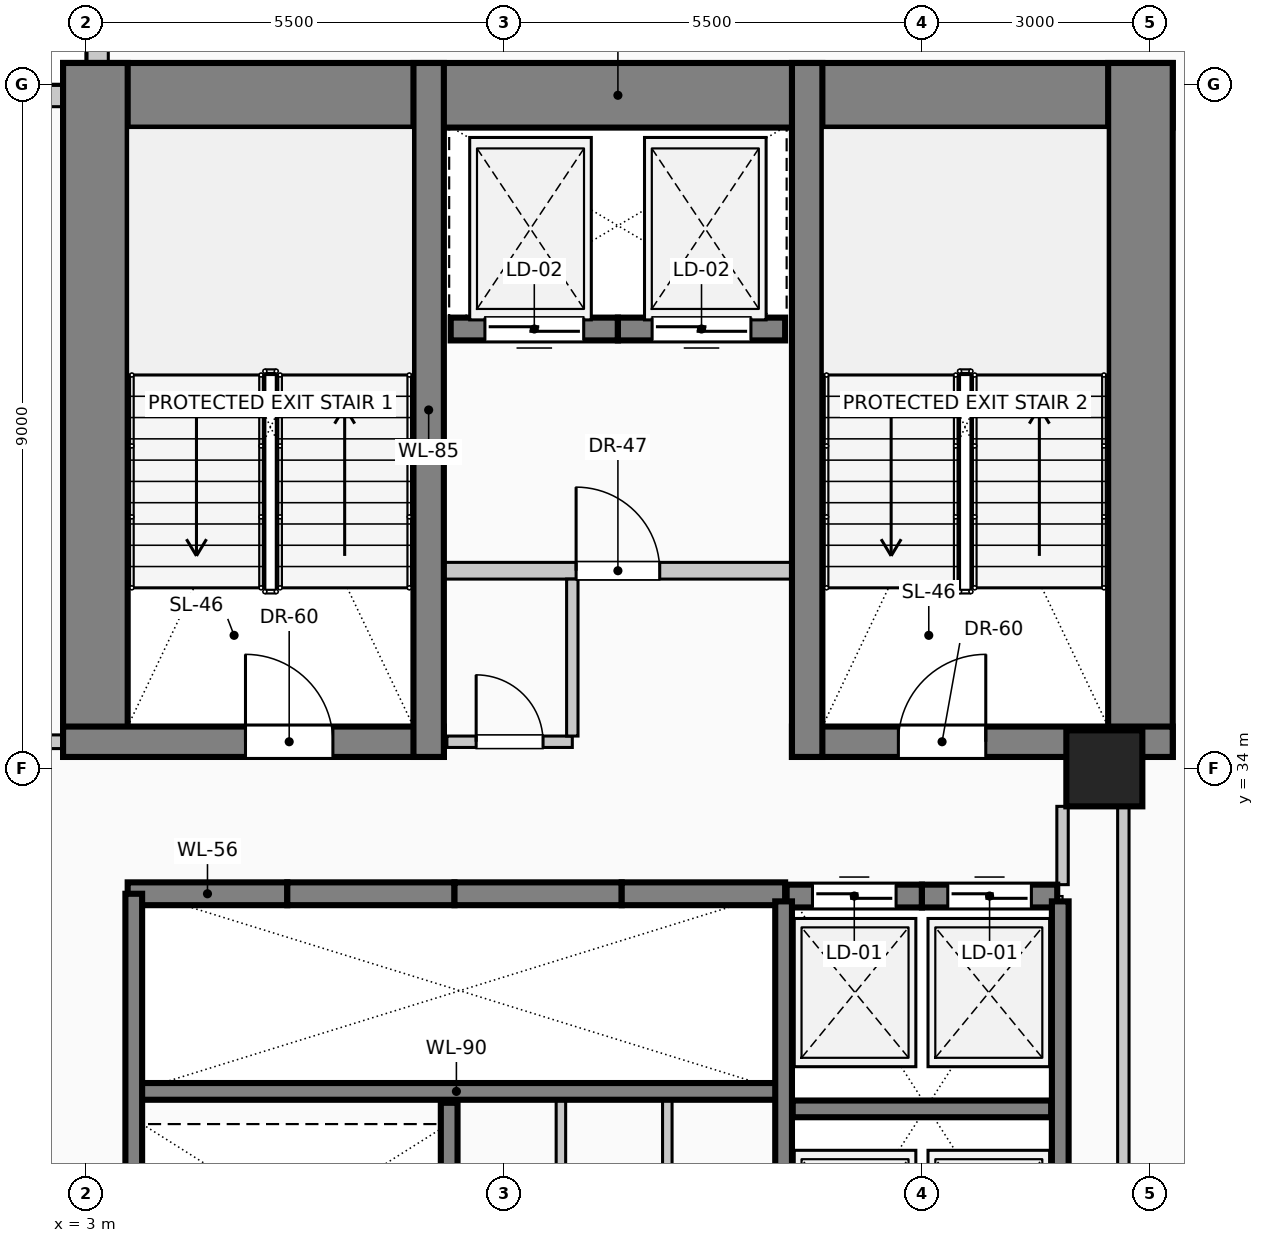
"""IFC4 building model, lengths in metres.
Left out: names, types, materials, properties, quantities, classifications, styles, units other than length and angle.
Written with IfcOpenShell. Run it as: python <this file> out.ifc"""

import sys

from ifc_helpers import new_model, si_unit, direction, frame, frame_2d, origin, origin_2d, place, context, subcontext, project, spatial, rectangle, circle, extrude, element, fill, save


model = new_model("IFC4")
c1 = context("Model", 3, precision=1e-05, world=origin(), true_north=direction((0.0, 1.0)))
c2 = subcontext(c1, "Body", "Model", "MODEL_VIEW")
j1 = project(units=[si_unit("LENGTHUNIT", "METRE"), si_unit("PLANEANGLEUNIT", "RADIAN")], contexts=[c1])
p1 = place(None, origin())
s1 = spatial("IfcSite", under=j1, at=p1, CompositionType="ELEMENT")
p2 = place(p1, origin())
s2 = spatial("IfcBuilding", under=s1, at=p2, CompositionType="ELEMENT")
p3 = place(p2, frame((0.0, 0.0, 116.6)))
s3 = spatial("IfcBuildingStorey", under=s2, at=p3, CompositionType="ELEMENT", Elevation=116.6)
p4 = place(p3, frame((2.7, 42.855, 0.0), z_axis=(0.0, 0.0, 1.0), x_axis=(1.0, 0.0, 0.0)))
e1 = element("IfcWall", 1, at=p4, inside=s3, PredefinedType="SHEAR", context=c2, shape_type="SweptSolid", body=[
    extrude(rectangle(XDim=14.6, YDim=0.85, at=frame_2d((7.3, 0.0))), origin(), (0.0, 0.0, 1.0), 4.0),
])
for number, where, z_axis, x_axis in (
    (2, (3.125, 34.15, 0.0), (0.0, 0.0, 1.0), (0.0, 1.0, 0.0)),
    (3, (16.875, 34.15, 0.0), (0.0, 0.0, 1.0), (0.0, 1.0, 0.0)),
):
    element("IfcWall", number, at=place(p3, frame(where, z_axis=z_axis, x_axis=x_axis)), inside=s3, PredefinedType="SHEAR", context=c2, shape_type="SweptSolid", body=[
        extrude(rectangle(XDim=9.13, YDim=0.85, at=frame_2d((4.565, 0.0))), origin(), (0.0, 0.0, 1.0), 4.0),
    ])
p5 = place(p3, frame((2.7, 34.35, 0.0), z_axis=(0.0, 0.0, 1.0), x_axis=(1.0, 0.0, 0.0)))
e4 = element("IfcWall", 4, at=p5, inside=s3, PredefinedType="SHEAR", context=c2, shape_type="SweptSolid", body=[
    extrude(rectangle(XDim=5.01, YDim=0.4, at=frame_2d((2.505, 0.0))), origin(), (0.0, 0.0, 1.0), 4.0),
])
p6 = place(p5, frame((2.4, 0.0, 0.0)))
e5 = element("IfcOpeningElement", 5, at=p6, cuts=e4, PredefinedType="OPENING", context=c2, shape_type="SweptSolid", body=[
    extrude(rectangle(XDim=1.15, YDim=2.2, at=frame_2d((0.575, 1.1))), frame((0.0, 0.21, 0.0), z_axis=(0.0, -1.0, 0.0), x_axis=(1.0, 0.0, 0.0)), (0.0, 0.0, 1.0), 0.42),
])
p7 = place(p3, frame((12.29, 34.35, 0.0), z_axis=(0.0, 0.0, 1.0), x_axis=(1.0, 0.0, 0.0)))
e6 = element("IfcWall", 6, at=p7, inside=s3, PredefinedType="SHEAR", context=c2, shape_type="SweptSolid", body=[
    extrude(rectangle(XDim=5.01, YDim=0.4, at=frame_2d((2.505, 0.0))), origin(), (0.0, 0.0, 1.0), 4.0),
])
p8 = place(p7, frame((1.4, 0.0, 0.0)))
e7 = element("IfcOpeningElement", 7, at=p8, cuts=e6, PredefinedType="OPENING", context=c2, shape_type="SweptSolid", body=[
    extrude(rectangle(XDim=1.15, YDim=2.2, at=frame_2d((0.575, 1.1))), frame((0.0, 0.21, 0.0), z_axis=(0.0, -1.0, 0.0), x_axis=(1.0, 0.0, 0.0)), (0.0, 0.0, 1.0), 0.42),
])
for number, where, z_axis, x_axis in (
    (8, (7.51, 34.15, 0.0), (0.0, 0.0, 1.0), (0.0, 1.0, 0.0)),
    (9, (12.49, 34.15, 0.0), (0.0, 0.0, 1.0), (0.0, 1.0, 0.0)),
):
    element("IfcWall", number, at=place(p3, frame(where, z_axis=z_axis, x_axis=x_axis)), inside=s3, PredefinedType="SHEAR", context=c2, shape_type="SweptSolid", body=[
        extrude(rectangle(XDim=9.13, YDim=0.4, at=frame_2d((4.565, 0.0))), origin(), (0.0, 0.0, 1.0), 4.0),
    ])
p9 = place(p3, frame((16.4, 34.0, 0.0), z_axis=(0.0, 0.0, 1.0), x_axis=(1.0, 0.0, 0.0)))
e10 = element("IfcColumn", 10, at=p9, inside=s3, PredefinedType="COLUMN", context=c2, shape_type="SweptSolid", body=[
    extrude(circle(Radius=0.5, at=origin_2d()), origin(), (0.0, 0.0, 1.0), 4.0),
])
p10 = place(p3, frame((0.6, 42.845, 0.0), z_axis=(0.0, 0.0, 1.0), x_axis=(1.0, 0.0, 0.0)))
e11 = element("IfcWall", 11, at=p10, inside=s3, PredefinedType="SOLIDWALL", context=c2, shape_type="SweptSolid", body=[
    extrude(rectangle(XDim=2.095, YDim=0.28, at=frame_2d((1.047, 0.0))), origin(), (0.0, 0.0, 1.0), 3.725),
])
p11 = place(p3, frame((3.155, 43.285, 0.0), z_axis=(0.0, 0.0, 1.0), x_axis=(0.0, 1.0, 0.0)))
e12 = element("IfcWall", 12, at=p11, inside=s3, PredefinedType="SOLIDWALL", context=c2, shape_type="SweptSolid", body=[
    extrude(rectangle(XDim=2.115, YDim=0.28, at=frame_2d((1.058, 0.0))), origin(), (0.0, 0.0, 1.0), 3.725),
])
p12 = place(p3, frame((12.22, 32.32, 0.0), z_axis=(0.0, 0.0, 1.0), x_axis=(1.0, 0.0, 0.0)))
e13 = element("IfcWall", 13, at=p12, inside=s3, PredefinedType="SOLIDWALL", context=c2, shape_type="SweptSolid", body=[
    extrude(rectangle(XDim=1.78, YDim=0.3, at=frame_2d((0.89, 0.0))), origin(), (0.0, 0.0, 1.0), 4.0),
])
p13 = place(p12, frame((0.34, 0.0, 0.0)))
e14 = element("IfcOpeningElement", 14, at=p13, cuts=e13, PredefinedType="OPENING", context=c2, shape_type="SweptSolid", body=[
    extrude(rectangle(XDim=1.1, YDim=2.2, at=frame_2d((0.55, 1.1))), frame((0.0, 0.16, 0.0), z_axis=(0.0, -1.0, 0.0), x_axis=(1.0, 0.0, 0.0)), (0.0, 0.0, 1.0), 0.32),
])
p14 = place(p3, frame((14.0, 32.32, 0.0), z_axis=(0.0, 0.0, 1.0), x_axis=(1.0, 0.0, 0.0)))
e15 = element("IfcWall", 15, at=p14, inside=s3, PredefinedType="SOLIDWALL", context=c2, shape_type="SweptSolid", body=[
    extrude(rectangle(XDim=1.78, YDim=0.3, at=frame_2d((0.89, 0.0))), origin(), (0.0, 0.0, 1.0), 4.0),
])
p15 = place(p14, frame((0.34, 0.0, 0.0)))
e16 = element("IfcOpeningElement", 16, at=p15, cuts=e15, PredefinedType="OPENING", context=c2, shape_type="SweptSolid", body=[
    extrude(rectangle(XDim=1.1, YDim=2.2, at=frame_2d((0.55, 1.1))), frame((0.0, 0.16, 0.0), z_axis=(0.0, -1.0, 0.0), x_axis=(1.0, 0.0, 0.0)), (0.0, 0.0, 1.0), 0.32),
])
p16 = place(p3, frame((3.55, 32.35, 0.0), z_axis=(0.0, 0.0, 1.0), x_axis=(1.0, 0.0, 0.0)))
e17 = element("IfcWall", 17, at=p16, inside=s3, PredefinedType="SOLIDWALL", context=c2, shape_type="SweptSolid", body=[
    extrude(rectangle(XDim=2.1, YDim=0.3, at=frame_2d((1.05, 0.0))), origin(), (0.0, 0.0, 1.0), 4.0),
])
p17 = place(p3, frame((5.65, 32.35, 0.0), z_axis=(0.0, 0.0, 1.0), x_axis=(1.0, 0.0, 0.0)))
e18 = element("IfcWall", 18, at=p17, inside=s3, PredefinedType="SOLIDWALL", context=c2, shape_type="SweptSolid", body=[
    extrude(rectangle(XDim=2.2, YDim=0.3, at=frame_2d((1.1, 0.0))), origin(), (0.0, 0.0, 1.0), 4.0),
])
p18 = place(p3, frame((7.85, 32.35, 0.0), z_axis=(0.0, 0.0, 1.0), x_axis=(1.0, 0.0, 0.0)))
e19 = element("IfcWall", 19, at=p18, inside=s3, PredefinedType="SOLIDWALL", context=c2, shape_type="SweptSolid", body=[
    extrude(rectangle(XDim=2.2, YDim=0.3, at=frame_2d((1.1, 0.0))), origin(), (0.0, 0.0, 1.0), 4.0),
])
p19 = place(p3, frame((10.05, 32.35, 0.0), z_axis=(0.0, 0.0, 1.0), x_axis=(1.0, 0.0, 0.0)))
e20 = element("IfcWall", 20, at=p19, inside=s3, PredefinedType="SOLIDWALL", context=c2, shape_type="SweptSolid", body=[
    extrude(rectangle(XDim=2.15, YDim=0.3, at=frame_2d((1.075, 0.0))), origin(), (0.0, 0.0, 1.0), 4.0),
])
p20 = place(p3, frame((10.0, 39.78, 0.0), z_axis=(0.0, 0.0, 1.0), x_axis=(-1.0, 0.0, 0.0)))
e21 = element("IfcWall", 21, at=p20, inside=s3, PredefinedType="SOLIDWALL", context=c2, shape_type="SweptSolid", body=[
    extrude(rectangle(XDim=2.2, YDim=0.3, at=frame_2d((1.1, 0.0))), origin(), (0.0, 0.0, 1.0), 4.0),
])
p21 = place(p20, frame((0.45, 0.0, 0.0)))
e22 = element("IfcOpeningElement", 22, at=p21, cuts=e21, PredefinedType="OPENING", context=c2, shape_type="SweptSolid", body=[
    extrude(rectangle(XDim=1.3, YDim=2.25, at=frame_2d((0.65, 1.125))), frame((0.0, 0.16, 0.0), z_axis=(0.0, -1.0, 0.0), x_axis=(1.0, 0.0, 0.0)), (0.0, 0.0, 1.0), 0.32),
])
p22 = place(p3, frame((12.2, 39.78, 0.0), z_axis=(0.0, 0.0, 1.0), x_axis=(-1.0, 0.0, 0.0)))
e23 = element("IfcWall", 23, at=p22, inside=s3, PredefinedType="SOLIDWALL", context=c2, shape_type="SweptSolid", body=[
    extrude(rectangle(XDim=2.2, YDim=0.3, at=frame_2d((1.1, 0.0))), origin(), (0.0, 0.0, 1.0), 4.0),
])
p23 = place(p22, frame((0.45, 0.0, 0.0)))
e24 = element("IfcOpeningElement", 24, at=p23, cuts=e23, PredefinedType="OPENING", context=c2, shape_type="SweptSolid", body=[
    extrude(rectangle(XDim=1.3, YDim=2.25, at=frame_2d((0.65, 1.125))), frame((0.0, 0.16, 0.0), z_axis=(0.0, -1.0, 0.0), x_axis=(1.0, 0.0, 0.0)), (0.0, 0.0, 1.0), 0.32),
])
p24 = place(p3, frame((3.55, 29.75, 0.0), z_axis=(0.0, 0.0, 1.0), x_axis=(1.0, 0.0, 0.0)))
e25 = element("IfcWall", 25, at=p24, inside=s3, PredefinedType="SOLIDWALL", context=c2, shape_type="SweptSolid", body=[
    extrude(rectangle(XDim=8.65, YDim=0.22, at=frame_2d((4.325, 0.0))), origin(), (0.0, 0.0, 1.0), 4.0),
])
p25 = place(p3, frame((3.63, 26.8, 0.0), z_axis=(0.0, 0.0, 1.0), x_axis=(0.0, 1.0, 0.0)))
e26 = element("IfcWall", 26, at=p25, inside=s3, PredefinedType="SOLIDWALL", context=c2, shape_type="SweptSolid", body=[
    extrude(rectangle(XDim=5.55, YDim=0.22, at=frame_2d((2.775, 0.0))), origin(), (0.0, 0.0, 1.0), 4.0),
])
p26 = place(p3, frame((7.78, 26.8, 0.0), z_axis=(0.0, 0.0, 1.0), x_axis=(0.0, 1.0, 0.0)))
e27 = element("IfcWall", 27, at=p26, inside=s3, PredefinedType="SOLIDWALL", context=c2, shape_type="SweptSolid", body=[
    extrude(rectangle(XDim=2.8, YDim=0.22, at=frame_2d((1.4, 0.0))), origin(), (0.0, 0.0, 1.0), 4.0),
])
for number, where, z_axis, x_axis in (
    (28, (12.18, 26.8, 0.0), (0.0, 0.0, 1.0), (0.0, 1.0, 0.0)),
    (29, (15.82, 26.8, 0.0), (0.0, 0.0, 1.0), (0.0, 1.0, 0.0)),
):
    element("IfcWall", number, at=place(p3, frame(where, z_axis=z_axis, x_axis=x_axis)), inside=s3, PredefinedType="SOLIDWALL", context=c2, shape_type="SweptSolid", body=[
        extrude(rectangle(XDim=5.45, YDim=0.22, at=frame_2d((2.725, 0.0))), origin(), (0.0, 0.0, 1.0), 4.0),
    ])
p27 = place(p3, frame((12.3, 29.52, 0.0), z_axis=(0.0, 0.0, 1.0), x_axis=(1.0, 0.0, 0.0)))
e30 = element("IfcWall", 30, at=p27, inside=s3, PredefinedType="SOLIDWALL", context=c2, shape_type="SweptSolid", body=[
    extrude(rectangle(XDim=3.4, YDim=0.22, at=frame_2d((1.7, 0.0))), origin(), (0.0, 0.0, 1.0), 4.0),
])
p28 = place(p3, frame((7.51, 36.6, 0.0), z_axis=(0.0, 0.0, 1.0), x_axis=(1.0, 0.0, 0.0)))
e31 = element("IfcWall", 31, at=p28, inside=s3, PredefinedType="PARTITIONING", context=c2, shape_type="SweptSolid", body=[
    extrude(rectangle(XDim=4.98, YDim=0.22, at=frame_2d((2.49, 0.0))), origin(), (0.0, 0.0, 1.0), 3.725),
])
p29 = place(p28, frame((1.94, 0.0, 0.0)))
e32 = element("IfcOpeningElement", 32, at=p29, cuts=e31, PredefinedType="OPENING", context=c2, shape_type="SweptSolid", body=[
    extrude(rectangle(XDim=1.1, YDim=2.2, at=frame_2d((0.55, 1.1))), frame((0.0, 0.12, 0.0), z_axis=(0.0, -1.0, 0.0), x_axis=(1.0, 0.0, 0.0)), (0.0, 0.0, 1.0), 0.24),
])
p30 = place(p3, frame((1.175, 34.35, 0.0), z_axis=(0.0, 0.0, 1.0), x_axis=(1.0, 0.0, 0.0)))
e33 = element("IfcWall", 33, at=p30, inside=s3, PredefinedType="PARTITIONING", context=c2, shape_type="SweptSolid", body=[
    extrude(rectangle(XDim=1.525, YDim=0.18, at=frame_2d((0.762, 0.0))), origin(), (0.0, 0.0, 1.0), 3.725),
])
p31 = place(p3, frame((7.75, 34.35, 0.0), z_axis=(0.0, 0.0, 1.0), x_axis=(1.0, 0.0, 0.0)))
e34 = element("IfcWall", 34, at=p31, inside=s3, PredefinedType="PARTITIONING", context=c2, shape_type="SweptSolid", body=[
    extrude(rectangle(XDim=1.65, YDim=0.15, at=frame_2d((0.825, 0.0))), origin(), (0.0, 0.0, 1.0), 3.725),
])
p32 = place(p31, frame((0.385, 0.0, 0.0)))
e35 = element("IfcOpeningElement", 35, at=p32, cuts=e34, PredefinedType="OPENING", context=c2, shape_type="SweptSolid", body=[
    extrude(rectangle(XDim=0.88, YDim=2.1, at=frame_2d((0.44, 1.05))), frame((0.0, 0.085, 0.0), z_axis=(0.0, -1.0, 0.0), x_axis=(1.0, 0.0, 0.0)), (0.0, 0.0, 1.0), 0.17),
])
p33 = place(p3, frame((9.25, 26.863, 0.0), z_axis=(0.0, 0.0, 1.0), x_axis=(0.0, 1.0, 0.0)))
e36 = element("IfcWall", 36, at=p33, inside=s3, PredefinedType="PARTITIONING", context=c2, shape_type="SweptSolid", body=[
    extrude(rectangle(XDim=2.777, YDim=0.125, at=frame_2d((1.389, 0.0))), origin(), (0.0, 0.0, 1.0), 3.725),
])
p34 = place(p3, frame((9.4, 34.425, 0.0), z_axis=(0.0, 0.0, 1.0), x_axis=(0.0, 1.0, 0.0)))
e37 = element("IfcWall", 37, at=p34, inside=s3, PredefinedType="PARTITIONING", context=c2, shape_type="SweptSolid", body=[
    extrude(rectangle(XDim=2.065, YDim=0.15, at=frame_2d((1.032, 0.0))), origin(), (0.0, 0.0, 1.0), 3.725),
])
p35 = place(p3, frame((10.65, 26.863, 0.0), z_axis=(0.0, 0.0, 1.0), x_axis=(0.0, 1.0, 0.0)))
e38 = element("IfcWall", 38, at=p35, inside=s3, PredefinedType="PARTITIONING", context=c2, shape_type="SweptSolid", body=[
    extrude(rectangle(XDim=2.777, YDim=0.125, at=frame_2d((1.389, 0.0))), origin(), (0.0, 0.0, 1.0), 3.725),
])
p36 = place(p3, frame((15.85, 32.47, 0.0), z_axis=(0.0, 0.0, 1.0), x_axis=(0.0, 1.0, 0.0)))
e39 = element("IfcWall", 39, at=p36, inside=s3, PredefinedType="PARTITIONING", context=c2, shape_type="SweptSolid", body=[
    extrude(rectangle(XDim=1.03, YDim=0.15, at=frame_2d((0.515, 0.0))), origin(), (0.0, 0.0, 1.0), 3.725),
])
p37 = place(p3, frame((16.65, 23.475, 0.0), z_axis=(0.0, 0.0, 1.0), x_axis=(0.0, 1.0, 0.0)))
e40 = element("IfcWall", 40, at=p37, inside=s3, PredefinedType="PARTITIONING", context=c2, shape_type="SweptSolid", body=[
    extrude(rectangle(XDim=10.025, YDim=0.15, at=frame_2d((5.012, 0.0))), origin(), (0.0, 0.0, 1.0), 3.07),
])
p38 = place(p13, origin())
e41 = element("IfcDoor", 41, at=p38, inside=s3, OperationType="SLIDING_TO_LEFT", PredefinedType="DOOR", context=c2, shape_type="SweptSolid", body=[
    extrude(rectangle(XDim=1.1, YDim=2.2, at=frame_2d((0.55, 1.1))), frame((0.0, 0.025, 0.0), z_axis=(0.0, -1.0, 0.0), x_axis=(1.0, 0.0, 0.0)), (0.0, 0.0, 1.0), 0.05),
])
fill(e14, e41)
p39 = place(p15, origin())
e42 = element("IfcDoor", 42, at=p39, inside=s3, OperationType="SLIDING_TO_RIGHT", PredefinedType="DOOR", context=c2, shape_type="SweptSolid", body=[
    extrude(rectangle(XDim=1.1, YDim=2.2, at=frame_2d((0.55, 1.1))), frame((0.0, 0.025, 0.0), z_axis=(0.0, -1.0, 0.0), x_axis=(1.0, 0.0, 0.0)), (0.0, 0.0, 1.0), 0.05),
])
fill(e16, e42)
p40 = place(p21, origin())
e43 = element("IfcDoor", 43, at=p40, inside=s3, OperationType="SLIDING_TO_LEFT", PredefinedType="DOOR", context=c2, shape_type="SweptSolid", body=[
    extrude(rectangle(XDim=1.3, YDim=2.25, at=frame_2d((0.65, 1.125))), frame((0.0, 0.025, 0.0), z_axis=(0.0, -1.0, 0.0), x_axis=(1.0, 0.0, 0.0)), (0.0, 0.0, 1.0), 0.05),
])
fill(e22, e43)
p41 = place(p23, origin())
e44 = element("IfcDoor", 44, at=p41, inside=s3, OperationType="SLIDING_TO_RIGHT", PredefinedType="DOOR", context=c2, shape_type="SweptSolid", body=[
    extrude(rectangle(XDim=1.3, YDim=2.25, at=frame_2d((0.65, 1.125))), frame((0.0, 0.025, 0.0), z_axis=(0.0, -1.0, 0.0), x_axis=(1.0, 0.0, 0.0)), (0.0, 0.0, 1.0), 0.05),
])
fill(e24, e44)
p42 = place(p6, origin())
e45 = element("IfcDoor", 45, at=p42, inside=s3, OperationType="SINGLE_SWING_LEFT", PredefinedType="DOOR", context=c2, shape_type="SweptSolid", body=[
    extrude(rectangle(XDim=1.15, YDim=2.2, at=frame_2d((0.575, 1.1))), frame((0.0, 0.025, 0.0), z_axis=(0.0, -1.0, 0.0), x_axis=(1.0, 0.0, 0.0)), (0.0, 0.0, 1.0), 0.05),
])
fill(e5, e45)
p43 = place(p8, origin())
e46 = element("IfcDoor", 46, at=p43, inside=s3, OperationType="SINGLE_SWING_RIGHT", PredefinedType="DOOR", context=c2, shape_type="SweptSolid", body=[
    extrude(rectangle(XDim=1.15, YDim=2.2, at=frame_2d((0.575, 1.1))), frame((0.0, 0.025, 0.0), z_axis=(0.0, -1.0, 0.0), x_axis=(1.0, 0.0, 0.0)), (0.0, 0.0, 1.0), 0.05),
])
fill(e7, e46)
p44 = place(p29, origin())
e47 = element("IfcDoor", 47, at=p44, inside=s3, OperationType="SINGLE_SWING_LEFT", PredefinedType="DOOR", context=c2, shape_type="SweptSolid", body=[
    extrude(rectangle(XDim=1.1, YDim=2.2, at=frame_2d((0.55, 1.1))), frame((0.0, 0.025, 0.0), z_axis=(0.0, -1.0, 0.0), x_axis=(1.0, 0.0, 0.0)), (0.0, 0.0, 1.0), 0.05),
])
fill(e32, e47)
p45 = place(p32, origin())
e48 = element("IfcDoor", 48, at=p45, inside=s3, OperationType="SINGLE_SWING_LEFT", PredefinedType="DOOR", context=c2, shape_type="SweptSolid", body=[
    extrude(rectangle(XDim=0.88, YDim=2.1, at=frame_2d((0.44, 1.05))), frame((0.0, 0.025, 0.0), z_axis=(0.0, -1.0, 0.0), x_axis=(1.0, 0.0, 0.0)), (0.0, 0.0, 1.0), 0.05),
])
fill(e35, e48)
save(model, sys.argv[1])
